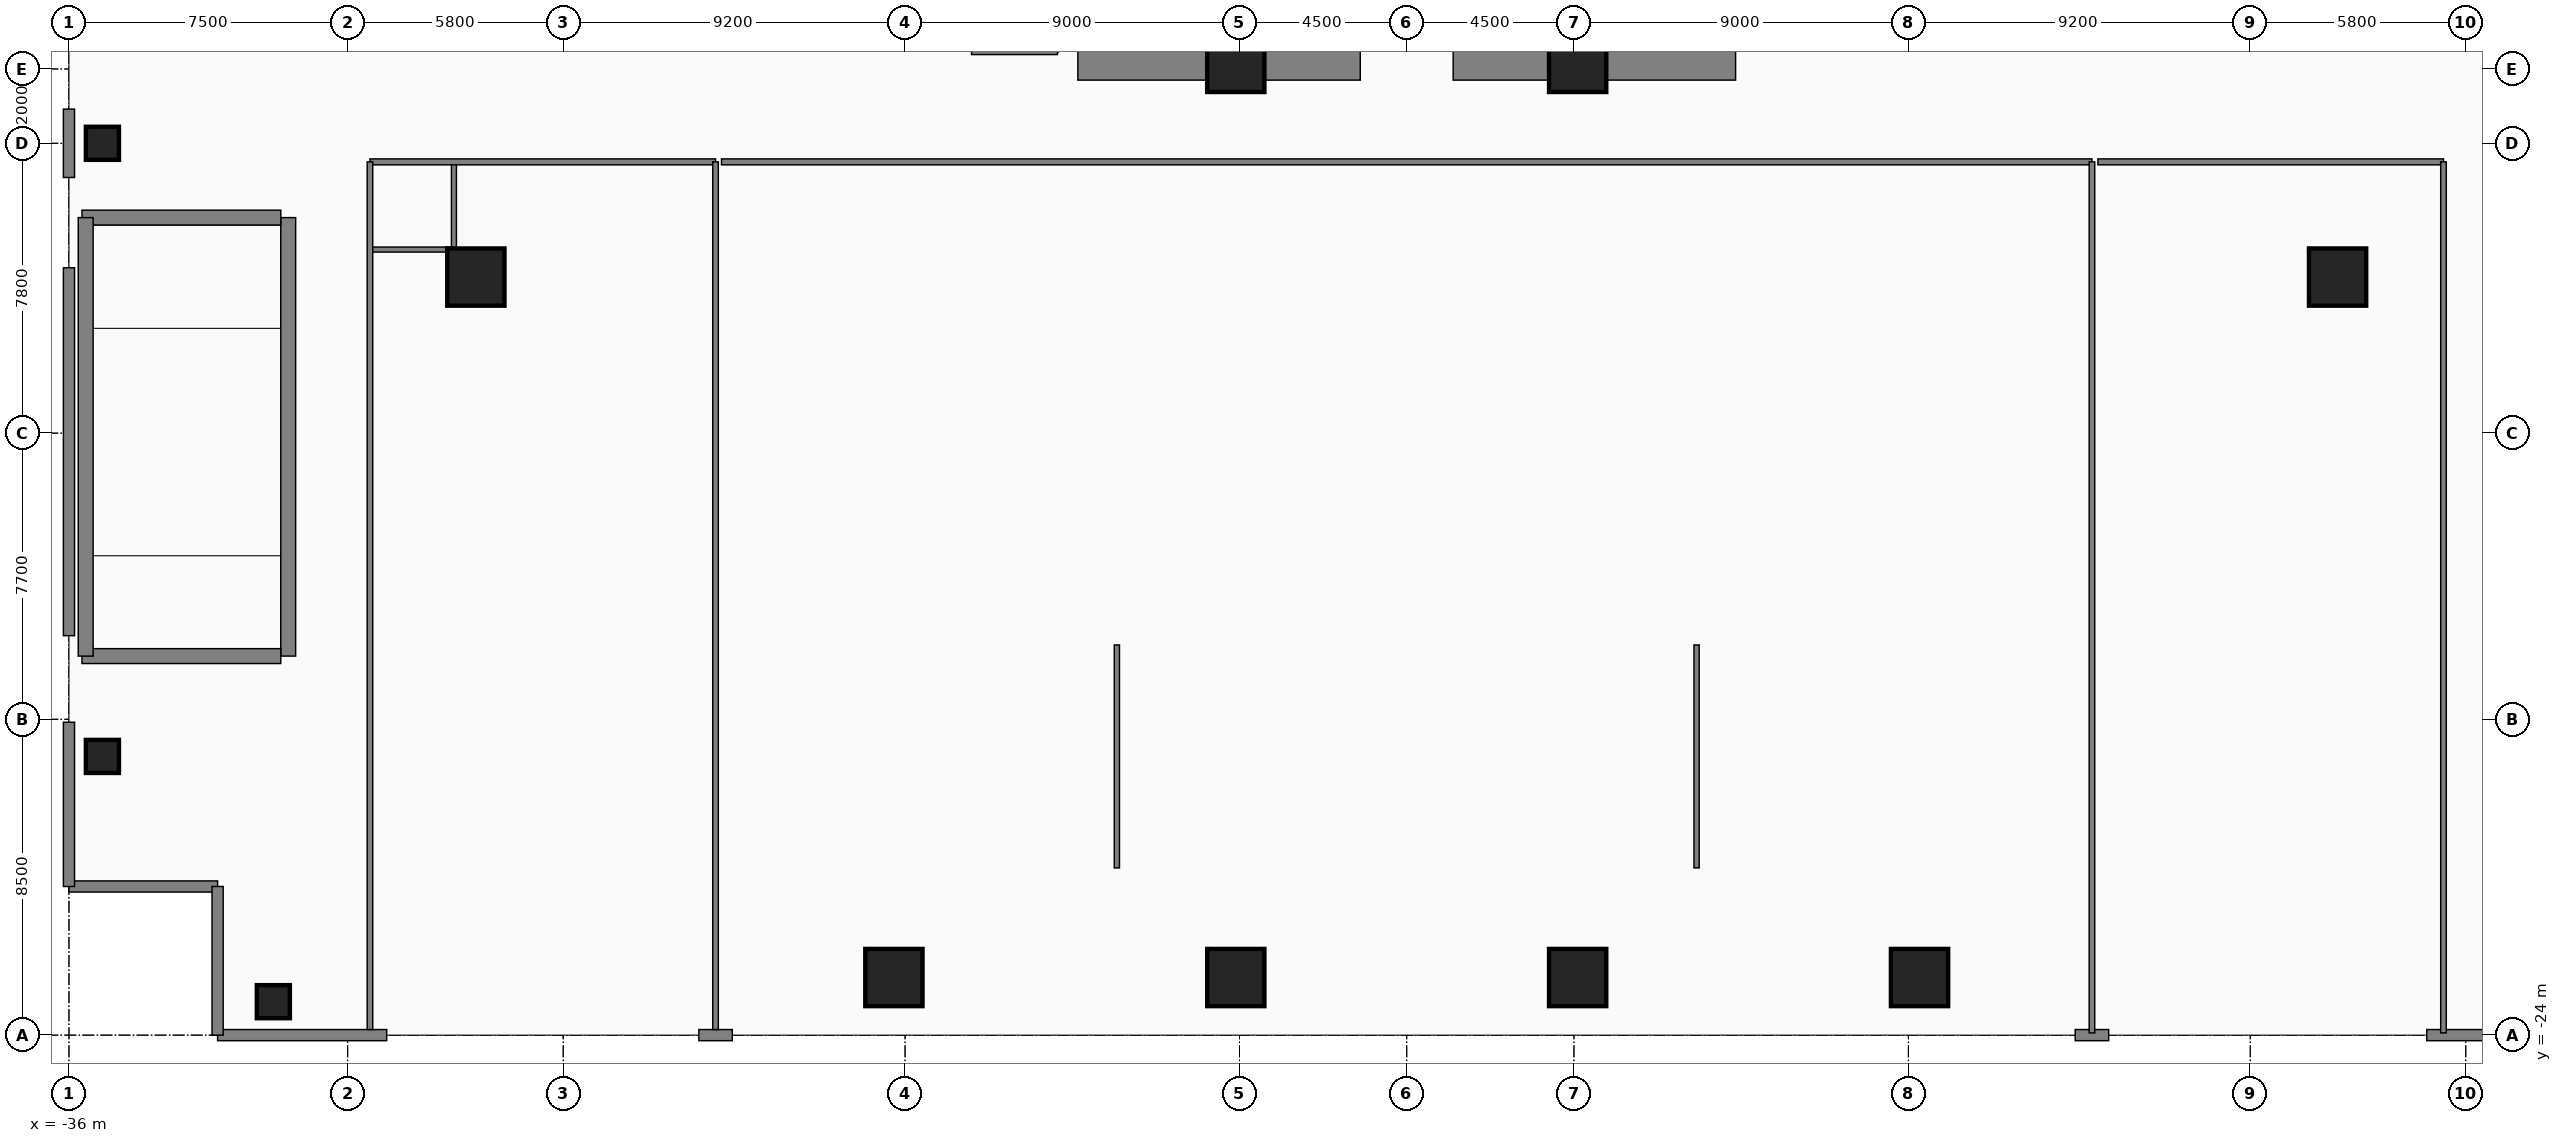
"""IFC4 building model, lengths in metres.
Left out: names, types, materials, properties, quantities, classifications, styles, units other than length and angle.
Written with IfcOpenShell. Run it as: python <this file> out.ifc"""

import sys

from ifc_helpers import new_model, si_unit, direction, frame, frame_2d, origin, origin_2d, place, context, subcontext, project, spatial, rectangle, extrude, element, fill, save


model = new_model("IFC4")
c1 = context("Model", 3, precision=1e-05, world=origin(), true_north=direction((0.0, 1.0)))
c2 = subcontext(c1, "Body", "Model", "MODEL_VIEW")
j1 = project(units=[si_unit("LENGTHUNIT", "METRE"), si_unit("PLANEANGLEUNIT", "RADIAN")], contexts=[c1])
p1 = place(None, origin())
s1 = spatial("IfcSite", under=j1, at=p1, CompositionType="ELEMENT")
p2 = place(p1, origin())
s2 = spatial("IfcBuilding", under=s1, at=p2, CompositionType="ELEMENT")
p3 = place(p2, frame((0.0, 0.0, 11.4)))
s3 = spatial("IfcBuildingStorey", under=s2, at=p3, CompositionType="ELEMENT", Elevation=11.4)
for number, where, z_axis, x_axis in (
    (1, (-8.85, 2.15, 0.0), (0.0, 0.0, 1.0), (1.0, 0.0, 0.0)),
    (2, (1.25, 2.15, 0.0), (0.0, 0.0, 1.0), (1.0, 0.0, 0.0)),
):
    element("IfcWall", number, at=place(p3, frame(where, z_axis=z_axis, x_axis=x_axis)), inside=s3, PredefinedType="SHEAR", context=c2, shape_type="SweptSolid", body=[
        extrude(rectangle(XDim=7.6, YDim=0.9, at=frame_2d((3.8, 0.0))), origin(), (0.0, 0.0, 1.0), 6.34),
    ])
p4 = place(p3, frame((-30.1, -13.8, 0.0), z_axis=(0.0, 0.0, 1.0), x_axis=(0.0, 1.0, 0.0)))
e3 = element("IfcWall", 3, at=p4, inside=s3, PredefinedType="SHEAR", context=c2, shape_type="SweptSolid", body=[
    extrude(rectangle(XDim=11.8, YDim=0.4, at=frame_2d((5.9, 0.0))), origin(), (0.0, 0.0, 1.0), 6.41),
])
p5 = place(p4, frame((0.45, 0.0, 0.0)))
e4 = element("IfcOpeningElement", 4, at=p5, cuts=e3, PredefinedType="OPENING", context=c2, shape_type="SweptSolid", body=[
    extrude(rectangle(XDim=1.12, YDim=2.22, at=frame_2d((0.56, 1.11))), frame((0.0, 0.21, 0.0), z_axis=(0.0, -1.0, 0.0), x_axis=(1.0, 0.0, 0.0)), (0.0, 0.0, 1.0), 0.42),
])
for number, where, z_axis, x_axis in (
    (5, (-35.65, -13.8, 0.0), (0.0, 0.0, 1.0), (1.0, 0.0, 0.0)),
    (6, (-35.65, -2.0, 0.0), (0.0, 0.0, 1.0), (1.0, 0.0, 0.0)),
):
    element("IfcWall", number, at=place(p3, frame(where, z_axis=z_axis, x_axis=x_axis)), inside=s3, PredefinedType="SHEAR", context=c2, shape_type="SweptSolid", body=[
        extrude(rectangle(XDim=5.35, YDim=0.4, at=frame_2d((2.675, 0.0))), origin(), (0.0, 0.0, 1.0), 6.41),
    ])
p6 = place(p3, frame((-35.55, -13.8, 0.0), z_axis=(0.0, 0.0, 1.0), x_axis=(0.0, 1.0, 0.0)))
e7 = element("IfcWall", 7, at=p6, inside=s3, PredefinedType="SHEAR", context=c2, shape_type="SweptSolid", body=[
    extrude(rectangle(XDim=11.8, YDim=0.4, at=frame_2d((5.9, 0.0))), origin(), (0.0, 0.0, 1.0), 6.41),
])
for number, where, z_axis, x_axis in (
    (8, (-4.6, 2.15, 0.0), (0.0, 0.0, 1.0), (1.0, 0.0, 0.0)),
    (9, (4.6, 2.15, 0.0), (0.0, 0.0, 1.0), (1.0, 0.0, 0.0)),
    (10, (-13.8, -22.45, 0.0), (0.0, 0.0, 1.0), (1.0, 0.0, 0.0)),
    (11, (-4.6, -22.45, 0.0), (0.0, 0.0, 1.0), (1.0, 0.0, 0.0)),
    (12, (4.6, -22.45, 0.0), (0.0, 0.0, 1.0), (1.0, 0.0, 0.0)),
    (13, (13.8, -22.45, 0.0), (0.0, 0.0, 1.0), (1.0, 0.0, 0.0)),
    (14, (-25.05, -3.6, 0.0), (0.0, 0.0, 1.0), (1.0, 0.0, 0.0)),
    (15, (25.05, -3.6, 0.0), (0.0, 0.0, 1.0), (1.0, 0.0, 0.0)),
):
    element("IfcColumn", number, at=place(p3, frame(where, z_axis=z_axis, x_axis=x_axis)), inside=s3, PredefinedType="COLUMN", context=c2, shape_type="SweptSolid", body=[
        extrude(rectangle(XDim=1.5, YDim=1.5, at=origin_2d()), origin(), (0.0, 0.0, 1.0), 6.6),
    ])
for number, where, z_axis, x_axis in (
    (16, (-30.5, -23.1, 0.0), (0.0, 0.0, 1.0), (1.0, 0.0, 0.0)),
    (17, (-35.1, -16.5, 0.0), (0.0, 0.0, 1.0), (1.0, 0.0, 0.0)),
    (18, (-35.1, 0.0, 0.0), (0.0, 0.0, 1.0), (1.0, 0.0, 0.0)),
):
    element("IfcColumn", number, at=place(p3, frame(where, z_axis=z_axis, x_axis=x_axis)), inside=s3, PredefinedType="COLUMN", context=c2, shape_type="SweptSolid", body=[
        extrude(rectangle(XDim=0.85, YDim=0.85, at=origin_2d()), origin(), (0.0, 0.0, 1.0), 6.6),
    ])
p7 = place(p3, frame((-32.0, -20.0, 0.0), z_axis=(0.0, 0.0, 1.0), x_axis=(-1.0, 0.0, 0.0)))
e19 = element("IfcWall", 19, at=p7, inside=s3, PredefinedType="STANDARD", context=c2, shape_type="SweptSolid", body=[
    extrude(rectangle(XDim=4.0, YDim=0.3, at=frame_2d((2.0, 0.0))), origin(), (0.0, 0.0, 1.0), 6.34),
])
p8 = place(p3, frame((-36.0, -20.0, 0.0), z_axis=(0.0, 0.0, 1.0), x_axis=(0.0, 1.0, 0.0)))
e20 = element("IfcWall", 20, at=p8, inside=s3, PredefinedType="STANDARD", context=c2, shape_type="SweptSolid", body=[
    extrude(rectangle(XDim=4.42, YDim=0.3, at=frame_2d((2.21, 0.0))), origin(), (0.0, 0.0, 1.0), 6.34),
])
p9 = place(p3, frame((-36.0, -13.25, 0.0), z_axis=(0.0, 0.0, 1.0), x_axis=(0.0, 1.0, 0.0)))
e21 = element("IfcWall", 21, at=p9, inside=s3, PredefinedType="STANDARD", context=c2, shape_type="SweptSolid", body=[
    extrude(rectangle(XDim=9.9, YDim=0.3, at=frame_2d((4.95, 0.0))), origin(), (0.0, 0.0, 1.0), 6.34),
])
p10 = place(p3, frame((-36.0, -0.92, 0.0), z_axis=(0.0, 0.0, 1.0), x_axis=(0.0, 1.0, 0.0)))
e22 = element("IfcWall", 22, at=p10, inside=s3, PredefinedType="STANDARD", context=c2, shape_type="SweptSolid", body=[
    extrude(rectangle(XDim=1.84, YDim=0.3, at=frame_2d((0.92, 0.0))), origin(), (0.0, 0.0, 1.0), 6.34),
])
p11 = place(p3, frame((32.0, -24.0, 0.0), z_axis=(0.0, 0.0, 1.0), x_axis=(-1.0, 0.0, 0.0)))
e23 = element("IfcWall", 23, at=p11, inside=s3, PredefinedType="STANDARD", context=c2, shape_type="SweptSolid", body=[
    extrude(rectangle(XDim=4.55, YDim=0.3, at=frame_2d((2.275, 0.0))), origin(), (0.0, 0.0, 1.0), 6.34),
])
p12 = place(p3, frame((18.89, -24.0, 0.0), z_axis=(0.0, 0.0, 1.0), x_axis=(-1.0, 0.0, 0.0)))
e24 = element("IfcWall", 24, at=p12, inside=s3, PredefinedType="STANDARD", context=c2, shape_type="SweptSolid", body=[
    extrude(rectangle(XDim=0.9, YDim=0.3, at=frame_2d((0.45, 0.0))), origin(), (0.0, 0.0, 1.0), 6.34),
])
p13 = place(p3, frame((-18.15, -24.0, 0.0), z_axis=(0.0, 0.0, 1.0), x_axis=(-1.0, 0.0, 0.0)))
e25 = element("IfcWall", 25, at=p13, inside=s3, PredefinedType="STANDARD", context=c2, shape_type="SweptSolid", body=[
    extrude(rectangle(XDim=0.9, YDim=0.3, at=frame_2d((0.45, 0.0))), origin(), (0.0, 0.0, 1.0), 6.34),
])
p14 = place(p3, frame((-27.45, -24.0, 0.0), z_axis=(0.0, 0.0, 1.0), x_axis=(-1.0, 0.0, 0.0)))
e26 = element("IfcWall", 26, at=p14, inside=s3, PredefinedType="STANDARD", context=c2, shape_type="SweptSolid", body=[
    extrude(rectangle(XDim=4.55, YDim=0.3, at=frame_2d((2.275, 0.0))), origin(), (0.0, 0.0, 1.0), 6.34),
])
p15 = place(p3, frame((-32.0, -24.0, 0.0), z_axis=(0.0, 0.0, 1.0), x_axis=(0.0, 1.0, 0.0)))
e27 = element("IfcWall", 27, at=p15, inside=s3, PredefinedType="STANDARD", context=c2, shape_type="SweptSolid", body=[
    extrude(rectangle(XDim=4.0, YDim=0.3, at=frame_2d((2.0, 0.0))), origin(), (0.0, 0.0, 1.0), 6.34),
])
p16 = place(p3, frame((-25.64, -2.86, 0.0), z_axis=(0.0, 0.0, 1.0), x_axis=(0.0, 1.0, 0.0)))
e28 = element("IfcWall", 28, at=p16, inside=s3, PredefinedType="PLUMBINGWALL", context=c2, shape_type="SweptSolid", body=[
    extrude(rectangle(XDim=2.36, YDim=0.135, at=frame_2d((1.18, 0.0))), origin(), (0.0, 0.0, 1.0), 6.34),
])
p17 = place(p16, frame((1.08, 0.0, 0.0)))
e29 = element("IfcOpeningElement", 29, at=p17, cuts=e28, PredefinedType="OPENING", context=c2, shape_type="SweptSolid", body=[
    extrude(rectangle(XDim=0.85, YDim=2.1, at=frame_2d((0.425, 1.05))), frame((0.0, 0.077, 0.0), z_axis=(0.0, -1.0, 0.0), x_axis=(1.0, 0.0, 0.0)), (0.0, 0.0, 1.0), 0.155),
])
p18 = place(p3, frame((-27.9, -0.5, 0.0), z_axis=(0.0, 0.0, 1.0), x_axis=(1.0, 0.0, 0.0)))
e30 = element("IfcWall", 30, at=p18, inside=s3, PredefinedType="PARTITIONING", context=c2, shape_type="SweptSolid", body=[
    extrude(rectangle(XDim=9.3, YDim=0.16, at=frame_2d((4.65, 0.0))), origin(), (0.0, 0.0, 1.0), 6.34),
])
p19 = place(p18, frame((5.3, 0.0, 0.0)))
e31 = element("IfcOpeningElement", 31, at=p19, cuts=e30, PredefinedType="OPENING", context=c2, shape_type="SweptSolid", body=[
    extrude(rectangle(XDim=1.0, YDim=2.15, at=frame_2d((0.5, 1.075))), frame((0.0, 0.09, 0.0), z_axis=(0.0, -1.0, 0.0), x_axis=(1.0, 0.0, 0.0)), (0.0, 0.0, 1.0), 0.18),
])
p20 = place(p3, frame((-18.44, -0.5, 0.0), z_axis=(0.0, 0.0, 1.0), x_axis=(1.0, 0.0, 0.0)))
e32 = element("IfcWall", 32, at=p20, inside=s3, PredefinedType="PARTITIONING", context=c2, shape_type="SweptSolid", body=[
    extrude(rectangle(XDim=36.88, YDim=0.16, at=frame_2d((18.44, 0.0))), origin(), (0.0, 0.0, 1.0), 6.34),
])
p21 = place(p20, frame((17.9, 0.0, 0.0)))
e33 = element("IfcOpeningElement", 33, at=p21, cuts=e32, PredefinedType="OPENING", context=c2, shape_type="SweptSolid", body=[
    extrude(rectangle(XDim=1.08, YDim=2.18, at=frame_2d((0.54, 1.09))), frame((0.0, 0.09, 0.0), z_axis=(0.0, -1.0, 0.0), x_axis=(1.0, 0.0, 0.0)), (0.0, 0.0, 1.0), 0.18),
])
p22 = place(p3, frame((18.6, -0.5, 0.0), z_axis=(0.0, 0.0, 1.0), x_axis=(1.0, 0.0, 0.0)))
e34 = element("IfcWall", 34, at=p22, inside=s3, PredefinedType="PARTITIONING", context=c2, shape_type="SweptSolid", body=[
    extrude(rectangle(XDim=9.3, YDim=0.16, at=frame_2d((4.65, 0.0))), origin(), (0.0, 0.0, 1.0), 6.34),
])
p23 = place(p22, frame((5.91, 0.0, 0.0)))
e35 = element("IfcOpeningElement", 35, at=p23, cuts=e34, PredefinedType="OPENING", context=c2, shape_type="SweptSolid", body=[
    extrude(rectangle(XDim=1.08, YDim=2.18, at=frame_2d((0.54, 1.09))), frame((0.0, 0.09, 0.0), z_axis=(0.0, -1.0, 0.0), x_axis=(1.0, 0.0, 0.0)), (0.0, 0.0, 1.0), 0.18),
])
p24 = place(p3, frame((-11.71, 2.47, 0.0), z_axis=(0.0, 0.0, 1.0), x_axis=(1.0, 0.0, 0.0)))
e36 = element("IfcWall", 36, at=p24, inside=s3, PredefinedType="PARTITIONING", context=c2, shape_type="SweptSolid", body=[
    extrude(rectangle(XDim=2.31, YDim=0.165, at=frame_2d((1.155, 0.0))), origin(), (0.0, 0.0, 1.0), 4.94),
])
p25 = place(p3, frame((-27.9, -2.86, 0.0), z_axis=(0.0, 0.0, 1.0), x_axis=(1.0, 0.0, 0.0)))
e37 = element("IfcWall", 37, at=p25, inside=s3, PredefinedType="PLUMBINGWALL", context=c2, shape_type="SweptSolid", body=[
    extrude(rectangle(XDim=2.26, YDim=0.135, at=frame_2d((1.13, 0.0))), origin(), (0.0, 0.0, 1.0), 6.34),
])
for number, where, z_axis, x_axis in (
    (38, (-27.9, -23.85, 0.0), (0.0, 0.0, 1.0), (0.0, 1.0, 0.0)),
    (39, (-18.6, -23.85, 0.0), (0.0, 0.0, 1.0), (0.0, 1.0, 0.0)),
):
    element("IfcWall", number, at=place(p3, frame(where, z_axis=z_axis, x_axis=x_axis)), inside=s3, PredefinedType="PARTITIONING", context=c2, shape_type="SweptSolid", body=[
        extrude(rectangle(XDim=23.35, YDim=0.15, at=frame_2d((11.675, 0.0))), origin(), (0.0, 0.0, 1.0), 6.34),
    ])
for number, where, z_axis, x_axis in (
    (40, (18.44, -23.94, 0.0), (0.0, 0.0, 1.0), (0.0, 1.0, 0.0)),
    (41, (27.9, -23.94, 0.0), (0.0, 0.0, 1.0), (0.0, 1.0, 0.0)),
):
    element("IfcWall", number, at=place(p3, frame(where, z_axis=z_axis, x_axis=x_axis)), inside=s3, PredefinedType="PARTITIONING", context=c2, shape_type="SweptSolid", body=[
        extrude(rectangle(XDim=23.44, YDim=0.15, at=frame_2d((11.72, 0.0))), origin(), (0.0, 0.0, 1.0), 6.34),
    ])
for number, where, z_axis, x_axis in (
    (42, (-7.8, -19.5, 0.0), (0.0, 0.0, 1.0), (0.0, 1.0, 0.0)),
    (43, (7.8, -19.5, 0.0), (0.0, 0.0, 1.0), (0.0, 1.0, 0.0)),
):
    element("IfcWall", number, at=place(p3, frame(where, z_axis=z_axis, x_axis=x_axis)), inside=s3, PredefinedType="MOVABLE", context=c2, shape_type="SweptSolid", body=[
        extrude(rectangle(XDim=6.0, YDim=0.14, at=frame_2d((3.0, 0.0))), origin(), (0.0, 0.0, 1.0), 6.34),
    ])
p26 = place(p5, origin())
e44 = element("IfcDoor", 44, at=p26, inside=s3, OperationType="SINGLE_SWING_RIGHT", PredefinedType="DOOR", context=c2, shape_type="SweptSolid", body=[
    extrude(rectangle(XDim=1.12, YDim=2.22, at=frame_2d((0.56, 1.11))), frame((0.0, 0.025, 0.0), z_axis=(0.0, -1.0, 0.0), x_axis=(1.0, 0.0, 0.0)), (0.0, 0.0, 1.0), 0.05),
])
fill(e4, e44)
p27 = place(p17, origin())
e45 = element("IfcDoor", 45, at=p27, inside=s3, OperationType="SINGLE_SWING_LEFT", PredefinedType="DOOR", context=c2, shape_type="SweptSolid", body=[
    extrude(rectangle(XDim=0.85, YDim=2.1, at=frame_2d((0.425, 1.05))), frame((0.0, 0.025, 0.0), z_axis=(0.0, -1.0, 0.0), x_axis=(1.0, 0.0, 0.0)), (0.0, 0.0, 1.0), 0.05),
])
fill(e29, e45)
p28 = place(p19, origin())
e46 = element("IfcDoor", 46, at=p28, inside=s3, OperationType="SINGLE_SWING_RIGHT", PredefinedType="DOOR", context=c2, shape_type="SweptSolid", body=[
    extrude(rectangle(XDim=1.0, YDim=2.15, at=frame_2d((0.5, 1.075))), frame((0.0, 0.025, 0.0), z_axis=(0.0, -1.0, 0.0), x_axis=(1.0, 0.0, 0.0)), (0.0, 0.0, 1.0), 0.05),
])
fill(e31, e46)
p29 = place(p21, origin())
e47 = element("IfcDoor", 47, at=p29, inside=s3, OperationType="SINGLE_SWING_LEFT", PredefinedType="DOOR", context=c2, shape_type="SweptSolid", body=[
    extrude(rectangle(XDim=1.08, YDim=2.18, at=frame_2d((0.54, 1.09))), frame((0.0, 0.025, 0.0), z_axis=(0.0, -1.0, 0.0), x_axis=(1.0, 0.0, 0.0)), (0.0, 0.0, 1.0), 0.05),
])
fill(e33, e47)
p30 = place(p23, origin())
e48 = element("IfcDoor", 48, at=p30, inside=s3, OperationType="SINGLE_SWING_RIGHT", PredefinedType="DOOR", context=c2, shape_type="SweptSolid", body=[
    extrude(rectangle(XDim=1.08, YDim=2.18, at=frame_2d((0.54, 1.09))), frame((0.0, 0.025, 0.0), z_axis=(0.0, -1.0, 0.0), x_axis=(1.0, 0.0, 0.0)), (0.0, 0.0, 1.0), 0.05),
])
fill(e35, e48)
save(model, sys.argv[1])
